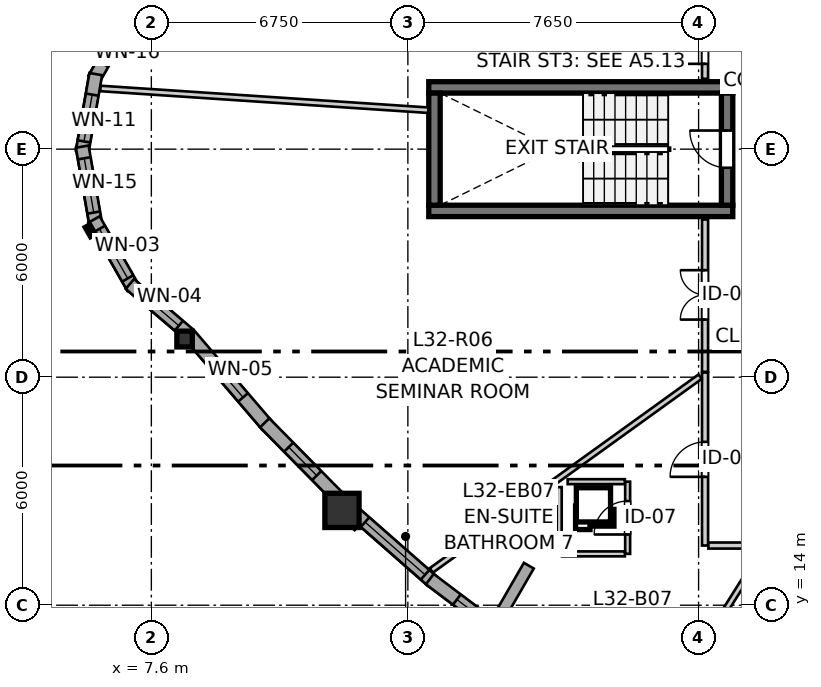
"""IFC4 building model, lengths in metres.
Left out: names, types, materials, properties, quantities, classifications, styles, units other than length and angle.
Written with IfcOpenShell. Run it as: python <this file> out.ifc"""

import sys

from ifc_helpers import new_model, si_unit, direction, frame, frame_2d, origin, origin_2d, place, context, subcontext, project, spatial, rectangle, i_section, extrude, source, transform, mapped, element, fill, save


model = new_model("IFC4")
c1 = context("Model", 3, precision=1e-05, world=origin(), true_north=direction((0.0, 1.0)))
c2 = subcontext(c1, "Body", "Model", "MODEL_VIEW")
j1 = project(units=[si_unit("LENGTHUNIT", "METRE"), si_unit("PLANEANGLEUNIT", "RADIAN")], contexts=[c1])
p1 = place(None, origin())
s1 = spatial("IfcSite", under=j1, at=p1, CompositionType="ELEMENT")
p2 = place(p1, origin())
s2 = spatial("IfcBuilding", under=s1, at=p2, CompositionType="ELEMENT")
p3 = place(p2, frame((0.0, 0.0, 108.8)))
s3 = spatial("IfcBuildingStorey", under=s2, at=p3, CompositionType="ELEMENT", Elevation=108.8)
for number, where, z_axis, x_axis in (
    (1, (14.9, 24.375, 0.0), (0.0, 0.0, 1.0), (1.0, 0.0, 0.0)),
    (2, (22.9, 27.625, 0.0), (0.0, 0.0, 1.0), (-1.0, 0.0, 0.0)),
):
    element("IfcWall", number, at=place(p3, frame(where, z_axis=z_axis, x_axis=x_axis)), inside=s3, PredefinedType="SHEAR", context=c2, shape_type="SweptSolid", body=[
        extrude(rectangle(XDim=8.0, YDim=0.3, at=frame_2d((4.0, 0.0))), origin(), (0.0, 0.0, 1.0), 2.935),
    ])
p4 = place(p3, frame((15.05, 27.475, 0.0), z_axis=(0.0, 0.0, 1.0), x_axis=(0.0, -1.0, 0.0)))
e3 = element("IfcWall", 3, at=p4, inside=s3, PredefinedType="SHEAR", context=c2, shape_type="SweptSolid", body=[
    extrude(rectangle(XDim=2.95, YDim=0.3, at=frame_2d((1.475, 0.0))), origin(), (0.0, 0.0, 1.0), 2.935),
])
p5 = place(p3, frame((22.75, 24.525, 0.0), z_axis=(0.0, 0.0, 1.0), x_axis=(0.0, 1.0, 0.0)))
e4 = element("IfcWall", 4, at=p5, inside=s3, PredefinedType="SHEAR", context=c2, shape_type="SweptSolid", body=[
    extrude(rectangle(XDim=2.95, YDim=0.3, at=frame_2d((1.475, 0.0))), origin(), (0.0, 0.0, 1.0), 2.935),
])
p6 = place(p5, frame((0.985, 0.0, 0.0)))
e5 = element("IfcOpeningElement", 5, at=p6, cuts=e4, PredefinedType="OPENING", context=c2, shape_type="SweptSolid", body=[
    extrude(rectangle(XDim=0.98, YDim=2.15, at=frame_2d((0.49, 1.075))), frame((0.0, 0.16, 0.0), z_axis=(0.0, -1.0, 0.0), x_axis=(1.0, 0.0, 0.0)), (0.0, 0.0, 1.0), 0.32),
])
m1 = source(origin(), c2, "Body", "SweptSolid", [
    extrude(i_section(OverallWidth=0.406, OverallDepth=0.416, WebThickness=0.027, FlangeThickness=0.044, FilletRadius=0.015, at=origin_2d()), origin(), (0.0, 0.0, 1.0), 2.935),
])
p7 = place(p3, frame((8.474, 21.004, 0.0), z_axis=(0.0, 0.0, 1.0), x_axis=(1.0, 0.0, 0.0)))
e6 = element("IfcColumn", 6, at=p7, inside=s3, PredefinedType="PILASTER", context=c2, shape_type="MappedRepresentation", body=[
    mapped(m1, transform((0.0, 0.0, 0.0), x_axis=(1.0, 0.0, 0.0), y_axis=(0.0, 1.0, 0.0), z_axis=(0.0, 0.0, 1.0), scale=1.0)),
])
m2 = source(origin(), c2, "Body", "SweptSolid", [
    extrude(rectangle(XDim=0.9, YDim=0.9, at=origin_2d()), origin(), (0.0, 0.0, 1.0), 2.935),
])
p8 = place(p3, frame((12.616, 16.495, 0.0), z_axis=(0.0, 0.0, 1.0), x_axis=(1.0, 0.0, 0.0)))
e7 = element("IfcColumn", 7, at=p8, inside=s3, PredefinedType="COLUMN", context=c2, shape_type="MappedRepresentation", body=[
    mapped(m2, transform((0.0, 0.0, 0.0), x_axis=(1.0, 0.0, 0.0), y_axis=(0.0, 1.0, 0.0), z_axis=(0.0, 0.0, 1.0), scale=1.0)),
])
p9 = place(p3, frame((7.121, 29.65, 0.0), z_axis=(0.0, 0.0, 1.0), x_axis=(-0.496037473582, -0.868301114132, 0.0)))
e8 = element("IfcWall", 8, at=p9, inside=s3, PredefinedType="SOLIDWALL", context=c2, shape_type="SweptSolid", body=[
    extrude(rectangle(XDim=2.073, YDim=0.34, at=frame_2d((1.037, 0.0))), origin(), (0.0, 0.0, 1.0), 2.465),
])
p10 = place(p9, frame((0.461, 0.0, 0.82)))
e9 = element("IfcOpeningElement", 9, at=p10, cuts=e8, PredefinedType="OPENING", context=c2, shape_type="SweptSolid", body=[
    extrude(rectangle(XDim=1.15, YDim=1.2, at=frame_2d((0.575, 0.6))), frame((0.0, 0.18, 0.0), z_axis=(0.0, -1.0, 0.0), x_axis=(1.0, 0.0, 0.0)), (0.0, 0.0, 1.0), 0.36),
])
p11 = place(p3, frame((6.138, 27.975, 0.0), z_axis=(0.0, 0.0, 1.0), x_axis=(-0.172186061474, -0.985064444711, 0.0)))
e10 = element("IfcWall", 10, at=p11, inside=s3, PredefinedType="SOLIDWALL", context=c2, shape_type="SweptSolid", body=[
    extrude(rectangle(XDim=2.073, YDim=0.34, at=frame_2d((1.037, 0.0))), origin(), (0.0, 0.0, 1.0), 2.465),
])
p12 = place(p11, frame((0.549, 0.0, 0.82)))
e11 = element("IfcOpeningElement", 11, at=p12, cuts=e10, PredefinedType="OPENING", context=c2, shape_type="SweptSolid", body=[
    extrude(rectangle(XDim=1.25, YDim=1.35, at=frame_2d((0.625, 0.675))), frame((0.0, 0.18, 0.0), z_axis=(0.0, -1.0, 0.0), x_axis=(1.0, 0.0, 0.0)), (0.0, 0.0, 1.0), 0.36),
])
p13 = place(p3, frame((5.781, 26.067, 0.0), z_axis=(0.0, 0.0, 1.0), x_axis=(0.172186061474, -0.985064444711, 0.0)))
e12 = element("IfcWall", 12, at=p13, inside=s3, PredefinedType="SOLIDWALL", context=c2, shape_type="SweptSolid", body=[
    extrude(rectangle(XDim=2.073, YDim=0.34, at=frame_2d((1.037, 0.0))), origin(), (0.0, 0.0, 1.0), 2.465),
])
p14 = place(p13, frame((0.312, 0.0, 0.82)))
e13 = element("IfcOpeningElement", 13, at=p14, cuts=e12, PredefinedType="OPENING", context=c2, shape_type="SweptSolid", body=[
    extrude(rectangle(XDim=1.45, YDim=1.25, at=frame_2d((0.725, 0.625))), frame((0.0, 0.18, 0.0), z_axis=(0.0, -1.0, 0.0), x_axis=(1.0, 0.0, 0.0)), (0.0, 0.0, 1.0), 0.36),
])
p15 = place(p3, frame((6.092, 24.15, 0.0), z_axis=(0.0, 0.0, 1.0), x_axis=(0.496037473582, -0.868301114132, 0.0)))
e14 = element("IfcWall", 14, at=p15, inside=s3, PredefinedType="SOLIDWALL", context=c2, shape_type="SweptSolid", body=[
    extrude(rectangle(XDim=2.073, YDim=0.34, at=frame_2d((1.037, 0.0))), origin(), (0.0, 0.0, 1.0), 2.465),
])
p16 = place(p15, frame((0.287, 0.0, 0.82)))
e15 = element("IfcOpeningElement", 15, at=p16, cuts=e14, PredefinedType="OPENING", context=c2, shape_type="SweptSolid", body=[
    extrude(rectangle(XDim=1.5, YDim=1.45, at=frame_2d((0.75, 0.725))), frame((0.0, 0.18, 0.0), z_axis=(0.0, -1.0, 0.0), x_axis=(1.0, 0.0, 0.0)), (0.0, 0.0, 1.0), 0.36),
])
p17 = place(p3, frame((7.035, 22.453, 0.0), z_axis=(0.0, 0.0, 1.0), x_axis=(0.76114353683, -0.648583469063, 0.0)))
e16 = element("IfcWall", 16, at=p17, inside=s3, PredefinedType="SOLIDWALL", context=c2, shape_type="SweptSolid", body=[
    extrude(rectangle(XDim=2.015, YDim=0.34, at=frame_2d((1.007, 0.0))), origin(), (0.0, 0.0, 1.0), 2.465),
])
p18 = place(p17, frame((0.343, 0.0, 0.82)))
e17 = element("IfcOpeningElement", 17, at=p18, cuts=e16, PredefinedType="OPENING", context=c2, shape_type="SweptSolid", body=[
    extrude(rectangle(XDim=1.35, YDim=1.45, at=frame_2d((0.675, 0.725))), frame((0.0, 0.18, 0.0), z_axis=(0.0, -1.0, 0.0), x_axis=(1.0, 0.0, 0.0)), (0.0, 0.0, 1.0), 0.36),
])
p19 = place(p3, frame((8.616, 21.099, 0.0), z_axis=(0.0, 0.0, 1.0), x_axis=(0.650713874475, -0.759323023203, 0.0)))
e18 = element("IfcWall", 18, at=p19, inside=s3, PredefinedType="SOLIDWALL", context=c2, shape_type="SweptSolid", body=[
    extrude(rectangle(XDim=3.113, YDim=0.34, at=frame_2d((1.557, 0.0))), origin(), (0.0, 0.0, 1.0), 2.465),
])
p20 = place(p19, frame((0.947, 0.0, 0.82)))
e19 = element("IfcOpeningElement", 19, at=p20, cuts=e18, PredefinedType="OPENING", context=c2, shape_type="SweptSolid", body=[
    extrude(rectangle(XDim=1.2, YDim=1.45, at=frame_2d((0.6, 0.725))), frame((0.0, 0.18, 0.0), z_axis=(0.0, -1.0, 0.0), x_axis=(1.0, 0.0, 0.0)), (0.0, 0.0, 1.0), 0.36),
])
p21 = place(p3, frame((10.583, 18.8, 0.0), z_axis=(0.0, 0.0, 1.0), x_axis=(0.701884352283, -0.712290920917, 0.0)))
e20 = element("IfcWall", 20, at=p21, inside=s3, PredefinedType="SOLIDWALL", context=c2, shape_type="SweptSolid", body=[
    extrude(rectangle(XDim=2.839, YDim=0.34, at=frame_2d((1.419, 0.0))), origin(), (0.0, 0.0, 1.0), 2.465),
])
p22 = place(p21, frame((0.899, 0.0, 0.82)))
e21 = element("IfcOpeningElement", 21, at=p22, cuts=e20, PredefinedType="OPENING", context=c2, shape_type="SweptSolid", body=[
    extrude(rectangle(XDim=1.05, YDim=1.45, at=frame_2d((0.525, 0.725))), frame((0.0, 0.18, 0.0), z_axis=(0.0, -1.0, 0.0), x_axis=(1.0, 0.0, 0.0)), (0.0, 0.0, 1.0), 0.36),
])
p23 = place(p3, frame((12.901, 16.471, 0.0), z_axis=(0.0, 0.0, 1.0), x_axis=(0.751480442913, -0.659755366722, 0.0)))
e22 = element("IfcWall", 22, at=p23, inside=s3, PredefinedType="SOLIDWALL", context=c2, shape_type="SweptSolid", body=[
    extrude(rectangle(XDim=2.789, YDim=0.34, at=frame_2d((1.395, 0.0))), origin(), (0.0, 0.0, 1.0), 2.465),
])
p24 = place(p23, frame((0.43, 0.0, 0.82)))
e23 = element("IfcOpeningElement", 23, at=p24, cuts=e22, PredefinedType="OPENING", context=c2, shape_type="SweptSolid", body=[
    extrude(rectangle(XDim=2.1, YDim=1.4, at=frame_2d((1.05, 0.7))), frame((0.0, 0.18, 0.0), z_axis=(0.0, -1.0, 0.0), x_axis=(1.0, 0.0, 0.0)), (0.0, 0.0, 1.0), 0.36),
])
p25 = place(p3, frame((14.928, 14.686, 0.0), z_axis=(0.0, 0.0, 1.0), x_axis=(0.798387010211, -0.602144651995, 0.0)))
e24 = element("IfcWall", 24, at=p25, inside=s3, PredefinedType="SOLIDWALL", context=c2, shape_type="SweptSolid", body=[
    extrude(rectangle(XDim=2.966, YDim=0.34, at=frame_2d((1.483, 0.0))), origin(), (0.0, 0.0, 1.0), 2.465),
])
p26 = place(p25, frame((0.891, 0.0, 0.82)))
e25 = element("IfcOpeningElement", 25, at=p26, cuts=e24, PredefinedType="OPENING", context=c2, shape_type="SweptSolid", body=[
    extrude(rectangle(XDim=0.58, YDim=1.35, at=frame_2d((0.29, 0.675))), frame((0.0, 0.18, 0.0), z_axis=(0.0, -1.0, 0.0), x_axis=(1.0, 0.0, 0.0)), (0.0, 0.0, 1.0), 0.36),
])
p27 = place(p3, frame((17.533, 15.04, 0.0), z_axis=(0.0, 0.0, 1.0), x_axis=(-0.499995950774, -0.866027741594, 0.0)))
e26 = element("IfcWall", 26, at=p27, inside=s3, PredefinedType="SOLIDWALL", context=c2, shape_type="SweptSolid", body=[
    extrude(rectangle(XDim=20.091, YDim=0.3, at=frame_2d((10.045, 0.0))), origin(), (0.0, 0.0, 1.0), 2.115),
])
p28 = place(p3, frame((22.17, 15.57, 0.0), z_axis=(0.0, 0.0, 1.0), x_axis=(0.0, 1.0, 0.0)))
e27 = element("IfcWall", 27, at=p28, inside=s3, PredefinedType="PARTITIONING", context=c2, shape_type="SweptSolid", body=[
    extrude(rectangle(XDim=4.555, YDim=0.16, at=frame_2d((2.277, 0.0))), origin(), (0.0, 0.0, 1.0), 2.935),
])
p29 = place(p28, frame((1.808, 0.0, 0.0)))
e28 = element("IfcOpeningElement", 28, at=p29, cuts=e27, PredefinedType="OPENING", context=c2, shape_type="SweptSolid", body=[
    extrude(rectangle(XDim=0.92, YDim=2.1, at=frame_2d((0.46, 1.05))), frame((0.0, 0.09, 0.0), z_axis=(0.0, -1.0, 0.0), x_axis=(1.0, 0.0, 0.0)), (0.0, 0.0, 1.0), 0.18),
])
p30 = place(p3, frame((22.17, 20.14, 0.0), z_axis=(0.0, 0.0, 1.0), x_axis=(0.0, 1.0, 0.0)))
e29 = element("IfcWall", 29, at=p30, inside=s3, PredefinedType="PARTITIONING", context=c2, shape_type="SweptSolid", body=[
    extrude(rectangle(XDim=4.01, YDim=0.16, at=frame_2d((2.005, 0.0))), origin(), (0.0, 0.0, 1.0), 2.935),
])
p31 = place(p30, frame((1.375, 0.0, 0.0)))
e30 = element("IfcOpeningElement", 30, at=p31, cuts=e29, PredefinedType="OPENING", context=c2, shape_type="SweptSolid", body=[
    extrude(rectangle(XDim=1.3, YDim=2.1, at=frame_2d((0.65, 1.05))), frame((0.0, 0.09, 0.0), z_axis=(0.0, -1.0, 0.0), x_axis=(1.0, 0.0, 0.0)), (0.0, 0.0, 1.0), 0.18),
])
p32 = place(p3, frame((22.17, 27.85, 0.0), z_axis=(0.0, 0.0, 1.0), x_axis=(0.0, 1.0, 0.0)))
e31 = element("IfcWall", 31, at=p32, inside=s3, PredefinedType="PARTITIONING", context=c2, shape_type="SweptSolid", body=[
    extrude(rectangle(XDim=2.0, YDim=0.16, at=frame_2d((1.0, 0.0))), origin(), (0.0, 0.0, 1.0), 2.935),
])
p33 = place(p32, frame((0.395, 0.0, 0.0)))
e32 = element("IfcOpeningElement", 32, at=p33, cuts=e31, PredefinedType="OPENING", context=c2, shape_type="SweptSolid", body=[
    extrude(rectangle(XDim=1.3, YDim=2.1, at=frame_2d((0.65, 1.05))), frame((0.0, 0.09, 0.0), z_axis=(0.0, -1.0, 0.0), x_axis=(1.0, 0.0, 0.0)), (0.0, 0.0, 1.0), 0.18),
])
p34 = place(p3, frame((20.133, 15.351, 0.0), z_axis=(0.0, 0.0, 1.0), x_axis=(0.0, 1.0, 0.0)))
e33 = element("IfcWall", 33, at=p34, inside=s3, PredefinedType="PARTITIONING", context=c2, shape_type="SweptSolid", body=[
    extrude(rectangle(XDim=1.9, YDim=0.13, at=frame_2d((0.95, 0.0))), origin(), (0.0, 0.0, 1.0), 2.935),
])
p35 = place(p34, frame((0.51, 0.0, 0.0)))
e34 = element("IfcOpeningElement", 34, at=p35, cuts=e33, PredefinedType="OPENING", context=c2, shape_type="SweptSolid", body=[
    extrude(rectangle(XDim=0.88, YDim=2.05, at=frame_2d((0.44, 1.025))), frame((0.0, 0.075, 0.0), z_axis=(0.0, -1.0, 0.0), x_axis=(1.0, 0.0, 0.0)), (0.0, 0.0, 1.0), 0.15),
])
p36 = place(p3, frame((14.966, 14.915, 0.0), z_axis=(0.0, 0.0, 1.0), x_axis=(0.811310715309, 0.584615192434, 0.0)))
e35 = element("IfcWall", 35, at=p36, inside=s3, PredefinedType="PARTITIONING", context=c2, shape_type="SweptSolid", body=[
    extrude(rectangle(XDim=8.72, YDim=0.145, at=frame_2d((4.36, 0.0))), origin(), (0.0, 0.0, 1.0), 2.103),
])
p37 = place(p3, frame((6.26, 27.597, 0.0), z_axis=(0.0, 0.0, 1.0), x_axis=(0.997805352235, -0.066215398902, 0.0)))
e36 = element("IfcWall", 36, at=p37, inside=s3, PredefinedType="PARTITIONING", context=c2, shape_type="SweptSolid", body=[
    extrude(rectangle(XDim=8.646, YDim=0.145, at=frame_2d((4.323, 0.0))), origin(), (0.0, 0.0, 1.0), 2.935),
])
p38 = place(p3, frame((20.845, 10.914, 0.0), z_axis=(0.0, 0.0, 1.0), x_axis=(0.533007953382, 0.846110230189, 0.0)))
e37 = element("IfcWall", 37, at=p38, inside=s3, PredefinedType="PARTITIONING", context=c2, shape_type="SweptSolid", body=[
    extrude(rectangle(XDim=5.354, YDim=0.145, at=frame_2d((2.677, 0.0))), origin(), (0.0, 0.0, 1.0), 2.935),
])
p39 = place(p3, frame((18.333, 15.351, 0.0), z_axis=(0.0, 0.0, 1.0), x_axis=(0.0, 1.0, 0.0)))
e38 = element("IfcWall", 38, at=p39, inside=s3, PredefinedType="PARTITIONING", context=c2, shape_type="SweptSolid", body=[
    extrude(rectangle(XDim=1.756, YDim=0.13, at=frame_2d((0.878, 0.0))), origin(), (0.0, 0.0, 1.0), 2.935),
])
p40 = place(p3, frame((18.555, 17.251, 0.0), z_axis=(0.0, 0.0, 1.0), x_axis=(1.0, 0.0, 0.0)))
e39 = element("IfcWall", 39, at=p40, inside=s3, PredefinedType="PARTITIONING", context=c2, shape_type="SweptSolid", body=[
    extrude(rectangle(XDim=1.505, YDim=0.13, at=frame_2d((0.752, 0.0))), origin(), (0.0, 0.0, 1.0), 2.935),
])
p41 = place(p3, frame((18.406, 15.351, 0.0), z_axis=(0.0, 0.0, 1.0), x_axis=(1.0, 0.0, 0.0)))
e40 = element("IfcWall", 40, at=p41, inside=s3, PredefinedType="PARTITIONING", context=c2, shape_type="SweptSolid", body=[
    extrude(rectangle(XDim=1.654, YDim=0.13, at=frame_2d((0.827, 0.0))), origin(), (0.0, 0.0, 1.0), 2.935),
])
p42 = place(p3, frame((22.258, 15.57, 0.0), z_axis=(0.0, 0.0, 1.0), x_axis=(1.0, 0.0, 0.0)))
e41 = element("IfcWall", 41, at=p42, inside=s3, PredefinedType="PARTITIONING", context=c2, shape_type="SweptSolid", body=[
    extrude(rectangle(XDim=1.344, YDim=0.16, at=frame_2d((0.672, 0.0))), origin(), (0.0, 0.0, 1.0), 2.935),
])
m3 = source(origin(), c2, "Body", "SweptSolid", [
    extrude(rectangle(XDim=1.15, YDim=1.2, at=frame_2d((0.575, 0.6))), frame((0.0, 0.03, 0.0), z_axis=(0.0, -1.0, 0.0), x_axis=(1.0, 0.0, 0.0)), (0.0, 0.0, 1.0), 0.06),
])
p43 = place(p10, origin())
e42 = element("IfcWindow", 42, at=p43, inside=s3, PartitioningType="SINGLE_PANEL", PredefinedType="WINDOW", context=c2, shape_type="MappedRepresentation", body=[
    mapped(m3, transform((0.0, 0.0, 0.0), x_axis=(1.0, 0.0, 0.0), y_axis=(0.0, 1.0, 0.0), z_axis=(0.0, 0.0, 1.0), scale=1.0)),
])
fill(e9, e42)
m4 = source(origin(), c2, "Body", "SweptSolid", [
    extrude(rectangle(XDim=1.25, YDim=1.35, at=frame_2d((0.625, 0.675))), frame((0.0, 0.03, 0.0), z_axis=(0.0, -1.0, 0.0), x_axis=(1.0, 0.0, 0.0)), (0.0, 0.0, 1.0), 0.06),
])
p44 = place(p12, origin())
e43 = element("IfcWindow", 43, at=p44, inside=s3, PartitioningType="SINGLE_PANEL", PredefinedType="WINDOW", context=c2, shape_type="MappedRepresentation", body=[
    mapped(m4, transform((0.0, 0.0, 0.0), x_axis=(1.0, 0.0, 0.0), y_axis=(0.0, 1.0, 0.0), z_axis=(0.0, 0.0, 1.0), scale=1.0)),
])
fill(e11, e43)
m5 = source(origin(), c2, "Body", "SweptSolid", [
    extrude(rectangle(XDim=1.45, YDim=1.25, at=frame_2d((0.725, 0.625))), frame((0.0, 0.03, 0.0), z_axis=(0.0, -1.0, 0.0), x_axis=(1.0, 0.0, 0.0)), (0.0, 0.0, 1.0), 0.06),
])
p45 = place(p14, origin())
e44 = element("IfcWindow", 44, at=p45, inside=s3, PartitioningType="SINGLE_PANEL", PredefinedType="WINDOW", context=c2, shape_type="MappedRepresentation", body=[
    mapped(m5, transform((0.0, 0.0, 0.0), x_axis=(1.0, 0.0, 0.0), y_axis=(0.0, 1.0, 0.0), z_axis=(0.0, 0.0, 1.0), scale=1.0)),
])
fill(e13, e44)
m6 = source(origin(), c2, "Body", "SweptSolid", [
    extrude(rectangle(XDim=1.5, YDim=1.45, at=frame_2d((0.75, 0.725))), frame((0.0, 0.03, 0.0), z_axis=(0.0, -1.0, 0.0), x_axis=(1.0, 0.0, 0.0)), (0.0, 0.0, 1.0), 0.06),
])
p46 = place(p16, origin())
e45 = element("IfcWindow", 45, at=p46, inside=s3, PartitioningType="SINGLE_PANEL", PredefinedType="WINDOW", context=c2, shape_type="MappedRepresentation", body=[
    mapped(m6, transform((0.0, 0.0, 0.0), x_axis=(1.0, 0.0, 0.0), y_axis=(0.0, 1.0, 0.0), z_axis=(0.0, 0.0, 1.0), scale=1.0)),
])
fill(e15, e45)
m7 = source(origin(), c2, "Body", "SweptSolid", [
    extrude(rectangle(XDim=1.35, YDim=1.45, at=frame_2d((0.675, 0.725))), frame((0.0, 0.03, 0.0), z_axis=(0.0, -1.0, 0.0), x_axis=(1.0, 0.0, 0.0)), (0.0, 0.0, 1.0), 0.06),
])
p47 = place(p18, origin())
e46 = element("IfcWindow", 46, at=p47, inside=s3, PartitioningType="SINGLE_PANEL", PredefinedType="WINDOW", context=c2, shape_type="MappedRepresentation", body=[
    mapped(m7, transform((0.0, 0.0, 0.0), x_axis=(1.0, 0.0, 0.0), y_axis=(0.0, 1.0, 0.0), z_axis=(0.0, 0.0, 1.0), scale=1.0)),
])
fill(e17, e46)
m8 = source(origin(), c2, "Body", "SweptSolid", [
    extrude(rectangle(XDim=1.2, YDim=1.45, at=frame_2d((0.6, 0.725))), frame((0.0, 0.03, 0.0), z_axis=(0.0, -1.0, 0.0), x_axis=(1.0, 0.0, 0.0)), (0.0, 0.0, 1.0), 0.06),
])
p48 = place(p20, origin())
e47 = element("IfcWindow", 47, at=p48, inside=s3, PartitioningType="SINGLE_PANEL", PredefinedType="WINDOW", context=c2, shape_type="MappedRepresentation", body=[
    mapped(m8, transform((0.0, 0.0, 0.0), x_axis=(1.0, 0.0, 0.0), y_axis=(0.0, 1.0, 0.0), z_axis=(0.0, 0.0, 1.0), scale=1.0)),
])
fill(e19, e47)
m9 = source(origin(), c2, "Body", "SweptSolid", [
    extrude(rectangle(XDim=1.05, YDim=1.45, at=frame_2d((0.525, 0.725))), frame((0.0, 0.03, 0.0), z_axis=(0.0, -1.0, 0.0), x_axis=(1.0, 0.0, 0.0)), (0.0, 0.0, 1.0), 0.06),
])
p49 = place(p22, origin())
e48 = element("IfcWindow", 48, at=p49, inside=s3, PartitioningType="SINGLE_PANEL", PredefinedType="WINDOW", context=c2, shape_type="MappedRepresentation", body=[
    mapped(m9, transform((0.0, 0.0, 0.0), x_axis=(1.0, 0.0, 0.0), y_axis=(0.0, 1.0, 0.0), z_axis=(0.0, 0.0, 1.0), scale=1.0)),
])
fill(e21, e48)
m10 = source(origin(), c2, "Body", "SweptSolid", [
    extrude(rectangle(XDim=2.1, YDim=1.4, at=frame_2d((1.05, 0.7))), frame((0.0, 0.03, 0.0), z_axis=(0.0, -1.0, 0.0), x_axis=(1.0, 0.0, 0.0)), (0.0, 0.0, 1.0), 0.06),
])
p50 = place(p24, origin())
e49 = element("IfcWindow", 49, at=p50, inside=s3, PartitioningType="SINGLE_PANEL", PredefinedType="WINDOW", context=c2, shape_type="MappedRepresentation", body=[
    mapped(m10, transform((0.0, 0.0, 0.0), x_axis=(1.0, 0.0, 0.0), y_axis=(0.0, 1.0, 0.0), z_axis=(0.0, 0.0, 1.0), scale=1.0)),
])
fill(e23, e49)
m11 = source(origin(), c2, "Body", "SweptSolid", [
    extrude(rectangle(XDim=0.58, YDim=1.35, at=frame_2d((0.29, 0.675))), frame((0.0, 0.03, 0.0), z_axis=(0.0, -1.0, 0.0), x_axis=(1.0, 0.0, 0.0)), (0.0, 0.0, 1.0), 0.06),
])
p51 = place(p26, origin())
e50 = element("IfcWindow", 50, at=p51, inside=s3, PartitioningType="SINGLE_PANEL", PredefinedType="WINDOW", context=c2, shape_type="MappedRepresentation", body=[
    mapped(m11, transform((0.0, 0.0, 0.0), x_axis=(1.0, 0.0, 0.0), y_axis=(0.0, 1.0, 0.0), z_axis=(0.0, 0.0, 1.0), scale=1.0)),
])
fill(e25, e50)
m12 = source(origin(), c2, "Body", "SweptSolid", [
    extrude(rectangle(XDim=0.98, YDim=2.15, at=frame_2d((0.49, 1.075))), frame((0.0, 0.025, 0.0), z_axis=(0.0, -1.0, 0.0), x_axis=(1.0, 0.0, 0.0)), (0.0, 0.0, 1.0), 0.05),
])
p52 = place(p6, origin())
e51 = element("IfcDoor", 51, at=p52, inside=s3, OperationType="SINGLE_SWING_RIGHT", PredefinedType="DOOR", context=c2, shape_type="MappedRepresentation", body=[
    mapped(m12, transform((0.0, 0.0, 0.0), x_axis=(1.0, 0.0, 0.0), y_axis=(0.0, 1.0, 0.0), z_axis=(0.0, 0.0, 1.0), scale=1.0)),
])
fill(e5, e51)
m13 = source(origin(), c2, "Body", "SweptSolid", [
    extrude(rectangle(XDim=0.92, YDim=2.1, at=frame_2d((0.46, 1.05))), frame((0.0, 0.025, 0.0), z_axis=(0.0, -1.0, 0.0), x_axis=(1.0, 0.0, 0.0)), (0.0, 0.0, 1.0), 0.05),
])
p53 = place(p29, origin())
e52 = element("IfcDoor", 52, at=p53, inside=s3, OperationType="SINGLE_SWING_LEFT", PredefinedType="DOOR", context=c2, shape_type="MappedRepresentation", body=[
    mapped(m13, transform((0.0, 0.0, 0.0), x_axis=(1.0, 0.0, 0.0), y_axis=(0.0, 1.0, 0.0), z_axis=(0.0, 0.0, 1.0), scale=1.0)),
])
fill(e28, e52)
m14 = source(origin(), c2, "Body", "SweptSolid", [
    extrude(rectangle(XDim=1.3, YDim=2.1, at=frame_2d((0.65, 1.05))), frame((0.0, 0.025, 0.0), z_axis=(0.0, -1.0, 0.0), x_axis=(1.0, 0.0, 0.0)), (0.0, 0.0, 1.0), 0.05),
])
p54 = place(p31, origin())
e53 = element("IfcDoor", 53, at=p54, inside=s3, OperationType="DOUBLE_DOOR_SINGLE_SWING", PredefinedType="DOOR", context=c2, shape_type="MappedRepresentation", body=[
    mapped(m14, transform((0.0, 0.0, 0.0), x_axis=(1.0, 0.0, 0.0), y_axis=(0.0, 1.0, 0.0), z_axis=(0.0, 0.0, 1.0), scale=1.0)),
])
fill(e30, e53)
p55 = place(p33, origin())
e54 = element("IfcDoor", 54, at=p55, inside=s3, OperationType="DOUBLE_DOOR_SINGLE_SWING", PredefinedType="DOOR", context=c2, shape_type="MappedRepresentation", body=[
    mapped(m14, transform((0.0, 0.0, 0.0), x_axis=(1.0, 0.0, 0.0), y_axis=(0.0, 1.0, 0.0), z_axis=(0.0, 0.0, 1.0), scale=1.0)),
])
fill(e32, e54)
m15 = source(origin(), c2, "Body", "SweptSolid", [
    extrude(rectangle(XDim=0.88, YDim=2.05, at=frame_2d((0.44, 1.025))), frame((0.0, 0.025, 0.0), z_axis=(0.0, -1.0, 0.0), x_axis=(1.0, 0.0, 0.0)), (0.0, 0.0, 1.0), 0.05),
])
p56 = place(p35, origin())
e55 = element("IfcDoor", 55, at=p56, inside=s3, OperationType="SINGLE_SWING_LEFT", PredefinedType="DOOR", context=c2, shape_type="MappedRepresentation", body=[
    mapped(m15, transform((0.0, 0.0, 0.0), x_axis=(1.0, 0.0, 0.0), y_axis=(0.0, 1.0, 0.0), z_axis=(0.0, 0.0, 1.0), scale=1.0)),
])
fill(e34, e55)
save(model, sys.argv[1])
